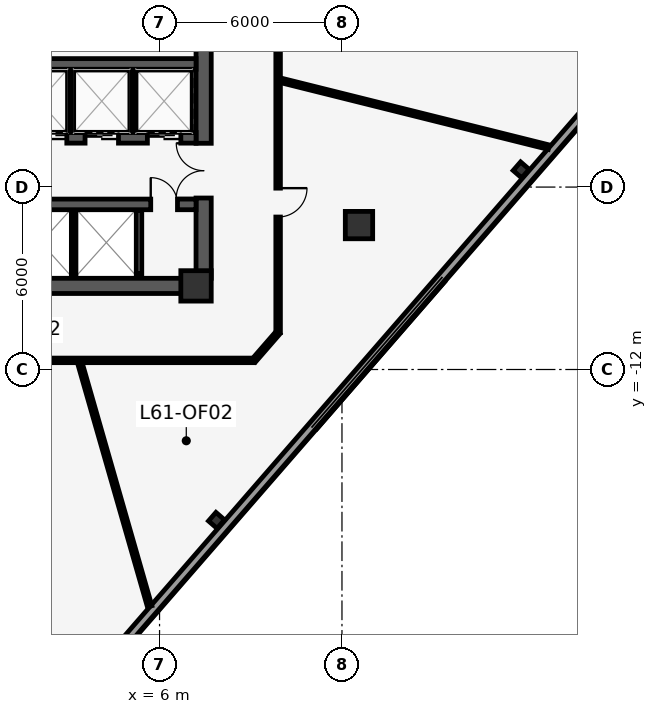
"""IFC4 building model, lengths in metres.
Left out: names, types, materials, properties, quantities, classifications, styles, units other than length and angle.
Written with IfcOpenShell. Run it as: python <this file> out.ifc"""

import sys

from ifc_helpers import new_model, si_unit, direction, frame, frame_2d, origin, origin_2d, place, context, subcontext, project, spatial, rectangle, i_section, extrude, element, fill, save


model = new_model("IFC4")
c1 = context("Model", 3, precision=1e-05, world=origin(), true_north=direction((0.0, 1.0)))
c2 = subcontext(c1, "Body", "Model", "MODEL_VIEW")
j1 = project(units=[si_unit("LENGTHUNIT", "METRE"), si_unit("PLANEANGLEUNIT", "RADIAN")], contexts=[c1])
p1 = place(None, origin())
s1 = spatial("IfcSite", under=j1, at=p1, CompositionType="ELEMENT")
p2 = place(p1, origin())
s2 = spatial("IfcBuilding", under=s1, at=p2, CompositionType="ELEMENT")
p3 = place(p2, frame((0.0, 0.0, 260.9)))
s3 = spatial("IfcBuildingStorey", under=s2, at=p3, CompositionType="ELEMENT", Elevation=260.9)
p4 = place(p3, frame((7.45, -9.0, 0.0), z_axis=(0.0, 0.0, 1.0), x_axis=(0.0, 1.0, 0.0)))
e1 = element("IfcWall", 1, at=p4, inside=s3, PredefinedType="SHEAR", context=c2, shape_type="SweptSolid", body=[
    extrude(rectangle(XDim=9.1, YDim=0.5, at=frame_2d((4.55, 0.0))), origin(), (0.0, 0.0, 1.0), 4.35),
])
p5 = place(p4, frame((2.64, 0.0, 0.0)))
e2 = element("IfcOpeningElement", 2, at=p5, cuts=e1, PredefinedType="OPENING", context=c2, shape_type="SweptSolid", body=[
    extrude(rectangle(XDim=1.8, YDim=2.2, at=frame_2d((0.9, 1.1))), frame((0.0, 0.26, 0.0), z_axis=(0.0, -1.0, 0.0), x_axis=(1.0, 0.0, 0.0)), (0.0, 0.0, 1.0), 0.52),
])
p6 = place(p4, frame((7.55, 0.0, 0.0)))
e3 = element("IfcOpeningElement", 3, at=p6, cuts=e1, PredefinedType="OPENING", context=c2, shape_type="SweptSolid", body=[
    extrude(rectangle(XDim=1.2, YDim=2.15, at=frame_2d((0.6, 1.075))), frame((0.0, 0.26, 0.0), z_axis=(0.0, -1.0, 0.0), x_axis=(1.0, 0.0, 0.0)), (0.0, 0.0, 1.0), 0.52),
])
p7 = place(p3, frame((-7.45, -9.25, 0.0), z_axis=(0.0, 0.0, 1.0), x_axis=(1.0, 0.0, 0.0)))
e4 = element("IfcWall", 4, at=p7, inside=s3, PredefinedType="SHEAR", context=c2, shape_type="SweptSolid", body=[
    extrude(rectangle(XDim=14.9, YDim=0.5, at=frame_2d((7.45, 0.0))), origin(), (0.0, 0.0, 1.0), 4.35),
])
p8 = place(p3, frame((-7.2, -1.95, 0.0), z_axis=(0.0, 0.0, 1.0), x_axis=(1.0, 0.0, 0.0)))
e5 = element("IfcWall", 5, at=p8, inside=s3, PredefinedType="SHEAR", context=c2, shape_type="SweptSolid", body=[
    extrude(rectangle(XDim=14.4, YDim=0.35, at=frame_2d((7.2, 0.0))), origin(), (0.0, 0.0, 1.0), 4.35),
])
p9 = place(p3, frame((-7.2, -4.38, 0.0), z_axis=(0.0, 0.0, 1.0), x_axis=(1.0, 0.0, 0.0)))
e6 = element("IfcWall", 6, at=p9, inside=s3, PredefinedType="SHEAR", context=c2, shape_type="SweptSolid", body=[
    extrude(rectangle(XDim=14.4, YDim=0.35, at=frame_2d((7.2, 0.0))), origin(), (0.0, 0.0, 1.0), 4.35),
])
p10 = place(p9, frame((9.05, 0.0, 0.0)))
e7 = element("IfcOpeningElement", 7, at=p10, cuts=e6, PredefinedType="OPENING", context=c2, shape_type="SweptSolid", body=[
    extrude(rectangle(XDim=1.1, YDim=2.2, at=frame_2d((0.55, 1.1))), frame((0.0, 0.185, 0.0), z_axis=(0.0, -1.0, 0.0), x_axis=(1.0, 0.0, 0.0)), (0.0, 0.0, 1.0), 0.37),
])
p11 = place(p9, frame((10.75, 0.0, 0.0)))
e8 = element("IfcOpeningElement", 8, at=p11, cuts=e6, PredefinedType="OPENING", context=c2, shape_type="SweptSolid", body=[
    extrude(rectangle(XDim=1.1, YDim=2.2, at=frame_2d((0.55, 1.1))), frame((0.0, 0.185, 0.0), z_axis=(0.0, -1.0, 0.0), x_axis=(1.0, 0.0, 0.0)), (0.0, 0.0, 1.0), 0.37),
])
p12 = place(p9, frame((12.8, 0.0, 0.0)))
e9 = element("IfcOpeningElement", 9, at=p12, cuts=e6, PredefinedType="OPENING", context=c2, shape_type="SweptSolid", body=[
    extrude(rectangle(XDim=1.1, YDim=2.2, at=frame_2d((0.55, 1.1))), frame((0.0, 0.185, 0.0), z_axis=(0.0, -1.0, 0.0), x_axis=(1.0, 0.0, 0.0)), (0.0, 0.0, 1.0), 0.37),
])
p13 = place(p9, frame((1.525, 0.0, 0.0)))
e10 = element("IfcOpeningElement", 10, at=p13, cuts=e6, PredefinedType="OPENING", context=c2, shape_type="SweptSolid", body=[
    extrude(rectangle(XDim=0.95, YDim=2.15, at=frame_2d((0.475, 1.075))), frame((0.0, 0.185, 0.0), z_axis=(0.0, -1.0, 0.0), x_axis=(1.0, 0.0, 0.0)), (0.0, 0.0, 1.0), 0.37),
])
p14 = place(p9, frame((5.625, 0.0, 0.0)))
e11 = element("IfcOpeningElement", 11, at=p14, cuts=e6, PredefinedType="OPENING", context=c2, shape_type="SweptSolid", body=[
    extrude(rectangle(XDim=0.95, YDim=2.15, at=frame_2d((0.475, 1.075))), frame((0.0, 0.185, 0.0), z_axis=(0.0, -1.0, 0.0), x_axis=(1.0, 0.0, 0.0)), (0.0, 0.0, 1.0), 0.37),
])
p15 = place(p3, frame((-7.2, -6.57, 0.0), z_axis=(0.0, 0.0, 1.0), x_axis=(1.0, 0.0, 0.0)))
e12 = element("IfcWall", 12, at=p15, inside=s3, PredefinedType="SHEAR", context=c2, shape_type="SweptSolid", body=[
    extrude(rectangle(XDim=14.4, YDim=0.35, at=frame_2d((7.2, 0.0))), origin(), (0.0, 0.0, 1.0), 4.35),
])
p16 = place(p15, frame((1.925, 0.0, 0.0)))
e13 = element("IfcOpeningElement", 13, at=p16, cuts=e12, PredefinedType="OPENING", context=c2, shape_type="SweptSolid", body=[
    extrude(rectangle(XDim=0.95, YDim=2.15, at=frame_2d((0.475, 1.075))), frame((0.0, 0.185, 0.0), z_axis=(0.0, -1.0, 0.0), x_axis=(1.0, 0.0, 0.0)), (0.0, 0.0, 1.0), 0.37),
])
p17 = place(p15, frame((5.975, 0.0, 0.0)))
e14 = element("IfcOpeningElement", 14, at=p17, cuts=e12, PredefinedType="OPENING", context=c2, shape_type="SweptSolid", body=[
    extrude(rectangle(XDim=0.95, YDim=2.15, at=frame_2d((0.475, 1.075))), frame((0.0, 0.185, 0.0), z_axis=(0.0, -1.0, 0.0), x_axis=(1.0, 0.0, 0.0)), (0.0, 0.0, 1.0), 0.37),
])
p18 = place(p15, frame((12.91, 0.0, 0.0)))
e15 = element("IfcOpeningElement", 15, at=p18, cuts=e12, PredefinedType="OPENING", context=c2, shape_type="SweptSolid", body=[
    extrude(rectangle(XDim=0.88, YDim=2.15, at=frame_2d((0.44, 1.075))), frame((0.0, 0.185, 0.0), z_axis=(0.0, -1.0, 0.0), x_axis=(1.0, 0.0, 0.0)), (0.0, 0.0, 1.0), 0.37),
])
p19 = place(p3, frame((7.2, -9.25, 0.0), z_axis=(0.0, 0.0, 1.0), x_axis=(1.0, 0.0, 0.0)))
e16 = element("IfcColumn", 16, at=p19, inside=s3, PredefinedType="COLUMN", context=c2, shape_type="SweptSolid", body=[
    extrude(rectangle(XDim=1.0, YDim=1.0, at=origin_2d()), origin(), (0.0, 0.0, 1.0), 4.6),
])
p20 = place(p3, frame((12.56, -7.25, 0.0), z_axis=(0.0, 0.0, 1.0), x_axis=(1.0, 0.0, 0.0)))
e17 = element("IfcColumn", 17, at=p20, inside=s3, PredefinedType="COLUMN", context=c2, shape_type="SweptSolid", body=[
    extrude(rectangle(XDim=0.9, YDim=0.9, at=origin_2d()), origin(), (0.0, 0.0, 1.0), 4.6),
])
for number, where, z_axis, x_axis in (
    (18, (7.874, -16.963, 0.0), (0.0, 0.0, 1.0), (0.656, 0.755, 0.0)),
    (19, (17.894, -5.436, 0.0), (0.0, 0.0, 1.0), (0.656, 0.755, 0.0)),
):
    element("IfcColumn", number, at=place(p3, frame(where, z_axis=z_axis, x_axis=x_axis)), inside=s3, PredefinedType="COLUMN", context=c2, shape_type="SweptSolid", body=[
        extrude(i_section(OverallWidth=0.373, OverallDepth=0.373, WebThickness=0.016, FlangeThickness=0.026, at=origin_2d()), origin(), (0.0, 0.0, 1.0), 4.6),
    ])
p21 = place(p3, frame((28.531, 6.268, 0.0), z_axis=(0.0, 0.0, 1.0), x_axis=(-0.656055748756, -0.754712431674, 0.0)))
e20 = element("IfcWall", 20, at=p21, inside=s3, PredefinedType="STANDARD", context=c2, shape_type="SweptSolid", body=[
    extrude(rectangle(XDim=46.897, YDim=0.28, at=frame_2d((23.448, 0.0))), origin(), (0.0, 0.0, 1.0), 4.35),
])
p22 = place(p21, frame((6.099, 0.0, 0.85)))
e21 = element("IfcOpeningElement", 21, at=p22, cuts=e20, PredefinedType="OPENING", context=c2, shape_type="SweptSolid", body=[
    extrude(rectangle(XDim=1.1, YDim=2.15, at=frame_2d((0.55, 1.075))), frame((0.0, 0.15, 0.0), z_axis=(0.0, -1.0, 0.0), x_axis=(1.0, 0.0, 0.0)), (0.0, 0.0, 1.0), 0.3),
])
p23 = place(p21, frame((11.698, 0.0, 0.85)))
e22 = element("IfcOpeningElement", 22, at=p23, cuts=e20, PredefinedType="OPENING", context=c2, shape_type="SweptSolid", body=[
    extrude(rectangle(XDim=1.1, YDim=2.15, at=frame_2d((0.55, 1.075))), frame((0.0, 0.15, 0.0), z_axis=(0.0, -1.0, 0.0), x_axis=(1.0, 0.0, 0.0)), (0.0, 0.0, 1.0), 0.3),
])
p24 = place(p21, frame((39.698, 0.0, 0.85)))
e23 = element("IfcOpeningElement", 23, at=p24, cuts=e20, PredefinedType="OPENING", context=c2, shape_type="SweptSolid", body=[
    extrude(rectangle(XDim=1.1, YDim=2.15, at=frame_2d((0.55, 1.075))), frame((0.0, 0.15, 0.0), z_axis=(0.0, -1.0, 0.0), x_axis=(1.0, 0.0, 0.0)), (0.0, 0.0, 1.0), 0.3),
])
for number, where, z_axis, x_axis in (
    (24, (3.075, -4.18, 0.0), (0.0, 0.0, 1.0), (0.0, 1.0, 0.0)),
    (25, (5.125, -4.18, 0.0), (0.0, 0.0, 1.0), (0.0, 1.0, 0.0)),
):
    element("IfcWall", number, at=place(p3, frame(where, z_axis=z_axis, x_axis=x_axis)), inside=s3, PredefinedType="PARTITIONING", context=c2, shape_type="SweptSolid", body=[
        extrude(rectangle(XDim=2.03, YDim=0.15, at=frame_2d((1.015, 0.0))), origin(), (0.0, 0.0, 1.0), 4.35),
    ])
p25 = place(p3, frame((3.175, -8.85, 0.0), z_axis=(0.0, 0.0, 1.0), x_axis=(0.0, 1.0, 0.0)))
e26 = element("IfcWall", 26, at=p25, inside=s3, PredefinedType="PARTITIONING", context=c2, shape_type="SweptSolid", body=[
    extrude(rectangle(XDim=2.08, YDim=0.15, at=frame_2d((1.04, 0.0))), origin(), (0.0, 0.0, 1.0), 4.35),
])
p26 = place(p3, frame((5.325, -8.85, 0.0), z_axis=(0.0, 0.0, 1.0), x_axis=(0.0, 1.0, 0.0)))
e27 = element("IfcWall", 27, at=p26, inside=s3, PredefinedType="PARTITIONING", context=c2, shape_type="SweptSolid", body=[
    extrude(rectangle(XDim=2.08, YDim=0.18, at=frame_2d((1.04, 0.0))), origin(), (0.0, 0.0, 1.0), 4.35),
])
p27 = place(p3, frame((9.9, 11.85, 0.0), z_axis=(0.0, 0.0, 1.0), x_axis=(0.0, -1.0, 0.0)))
e28 = element("IfcWall", 28, at=p27, inside=s3, PredefinedType="PARTITIONING", context=c2, shape_type="SweptSolid", body=[
    extrude(rectangle(XDim=22.634, YDim=0.15, at=frame_2d((11.317, 0.0))), origin(), (0.0, 0.0, 1.0), 4.35),
])
p28 = place(p27, frame((17.885, 0.0, 0.0)))
e29 = element("IfcOpeningElement", 29, at=p28, cuts=e28, PredefinedType="OPENING", context=c2, shape_type="SweptSolid", body=[
    extrude(rectangle(XDim=0.95, YDim=2.15, at=frame_2d((0.475, 1.075))), frame((0.0, 0.085, 0.0), z_axis=(0.0, -1.0, 0.0), x_axis=(1.0, 0.0, 0.0)), (0.0, 0.0, 1.0), 0.17),
])
p29 = place(p27, frame((6.82, 0.0, 0.0)))
e30 = element("IfcOpeningElement", 30, at=p29, cuts=e28, PredefinedType="OPENING", context=c2, shape_type="SweptSolid", body=[
    extrude(rectangle(XDim=0.95, YDim=2.15, at=frame_2d((0.475, 1.075))), frame((0.0, 0.085, 0.0), z_axis=(0.0, -1.0, 0.0), x_axis=(1.0, 0.0, 0.0)), (0.0, 0.0, 1.0), 0.17),
])
p30 = place(p3, frame((9.9, -10.783, 0.0), z_axis=(0.0, 0.0, 1.0), x_axis=(-0.656024397367, -0.754739683639, 0.0)))
e31 = element("IfcWall", 31, at=p30, inside=s3, PredefinedType="PARTITIONING", context=c2, shape_type="SweptSolid", body=[
    extrude(rectangle(XDim=1.214, YDim=0.15, at=frame_2d((0.607, 0.0))), origin(), (0.0, 0.0, 1.0), 4.35),
])
p31 = place(p3, frame((9.103, -11.7, 0.0), z_axis=(0.0, 0.0, 1.0), x_axis=(-1.0, 0.0, 0.0)))
e32 = element("IfcWall", 32, at=p31, inside=s3, PredefinedType="PARTITIONING", context=c2, shape_type="SweptSolid", body=[
    extrude(rectangle(XDim=11.323, YDim=0.15, at=frame_2d((5.662, 0.0))), origin(), (0.0, 0.0, 1.0), 4.35),
])
p32 = place(p3, frame((3.385, -11.805, 0.0), z_axis=(0.0, 0.0, 1.0), x_axis=(0.275648725589, -0.961258435636, 0.0)))
e33 = element("IfcWall", 33, at=p32, inside=s3, PredefinedType="PARTITIONING", context=c2, shape_type="SweptSolid", body=[
    extrude(rectangle(XDim=8.307, YDim=0.15, at=frame_2d((4.153, 0.0))), origin(), (0.0, 0.0, 1.0), 4.35),
])
p33 = place(p3, frame((10.005, -2.494, 0.0), z_axis=(0.0, 0.0, 1.0), x_axis=(0.970294360483, -0.24192737343, 0.0)))
e34 = element("IfcWall", 34, at=p33, inside=s3, PredefinedType="PARTITIONING", context=c2, shape_type="SweptSolid", body=[
    extrude(rectangle(XDim=9.067, YDim=0.15, at=frame_2d((4.534, 0.0))), origin(), (0.0, 0.0, 1.0), 4.35),
])
p34 = place(p10, origin())
e35 = element("IfcDoor", 35, at=p34, inside=s3, OperationType="DOUBLE_DOOR_SLIDING", PredefinedType="DOOR", context=c2, shape_type="SweptSolid", body=[
    extrude(rectangle(XDim=1.1, YDim=2.2, at=frame_2d((0.55, 1.1))), frame((0.0, 0.025, 0.0), z_axis=(0.0, -1.0, 0.0), x_axis=(1.0, 0.0, 0.0)), (0.0, 0.0, 1.0), 0.05),
])
fill(e7, e35)
p35 = place(p11, origin())
e36 = element("IfcDoor", 36, at=p35, inside=s3, OperationType="DOUBLE_DOOR_SLIDING", PredefinedType="DOOR", context=c2, shape_type="SweptSolid", body=[
    extrude(rectangle(XDim=1.1, YDim=2.2, at=frame_2d((0.55, 1.1))), frame((0.0, 0.025, 0.0), z_axis=(0.0, -1.0, 0.0), x_axis=(1.0, 0.0, 0.0)), (0.0, 0.0, 1.0), 0.05),
])
fill(e8, e36)
p36 = place(p12, origin())
e37 = element("IfcDoor", 37, at=p36, inside=s3, OperationType="DOUBLE_DOOR_SLIDING", PredefinedType="DOOR", context=c2, shape_type="SweptSolid", body=[
    extrude(rectangle(XDim=1.1, YDim=2.2, at=frame_2d((0.55, 1.1))), frame((0.0, 0.025, 0.0), z_axis=(0.0, -1.0, 0.0), x_axis=(1.0, 0.0, 0.0)), (0.0, 0.0, 1.0), 0.05),
])
fill(e9, e37)
p37 = place(p5, origin())
e38 = element("IfcDoor", 38, at=p37, inside=s3, OperationType="DOUBLE_DOOR_SINGLE_SWING", PredefinedType="DOOR", context=c2, shape_type="SweptSolid", body=[
    extrude(rectangle(XDim=1.8, YDim=2.2, at=frame_2d((0.9, 1.1))), frame((0.0, 0.025, 0.0), z_axis=(0.0, -1.0, 0.0), x_axis=(1.0, 0.0, 0.0)), (0.0, 0.0, 1.0), 0.05),
])
fill(e2, e38)
p38 = place(p18, origin())
e39 = element("IfcDoor", 39, at=p38, inside=s3, OperationType="SINGLE_SWING_LEFT", PredefinedType="DOOR", context=c2, shape_type="SweptSolid", body=[
    extrude(rectangle(XDim=0.88, YDim=2.15, at=frame_2d((0.44, 1.075))), frame((0.0, 0.025, 0.0), z_axis=(0.0, -1.0, 0.0), x_axis=(1.0, 0.0, 0.0)), (0.0, 0.0, 1.0), 0.05),
])
fill(e15, e39)
p39 = place(p28, origin())
e40 = element("IfcDoor", 40, at=p39, inside=s3, OperationType="SINGLE_SWING_LEFT", PredefinedType="DOOR", context=c2, shape_type="SweptSolid", body=[
    extrude(rectangle(XDim=0.95, YDim=2.15, at=frame_2d((0.475, 1.075))), frame((0.0, 0.025, 0.0), z_axis=(0.0, -1.0, 0.0), x_axis=(1.0, 0.0, 0.0)), (0.0, 0.0, 1.0), 0.05),
])
fill(e29, e40)
save(model, sys.argv[1])
